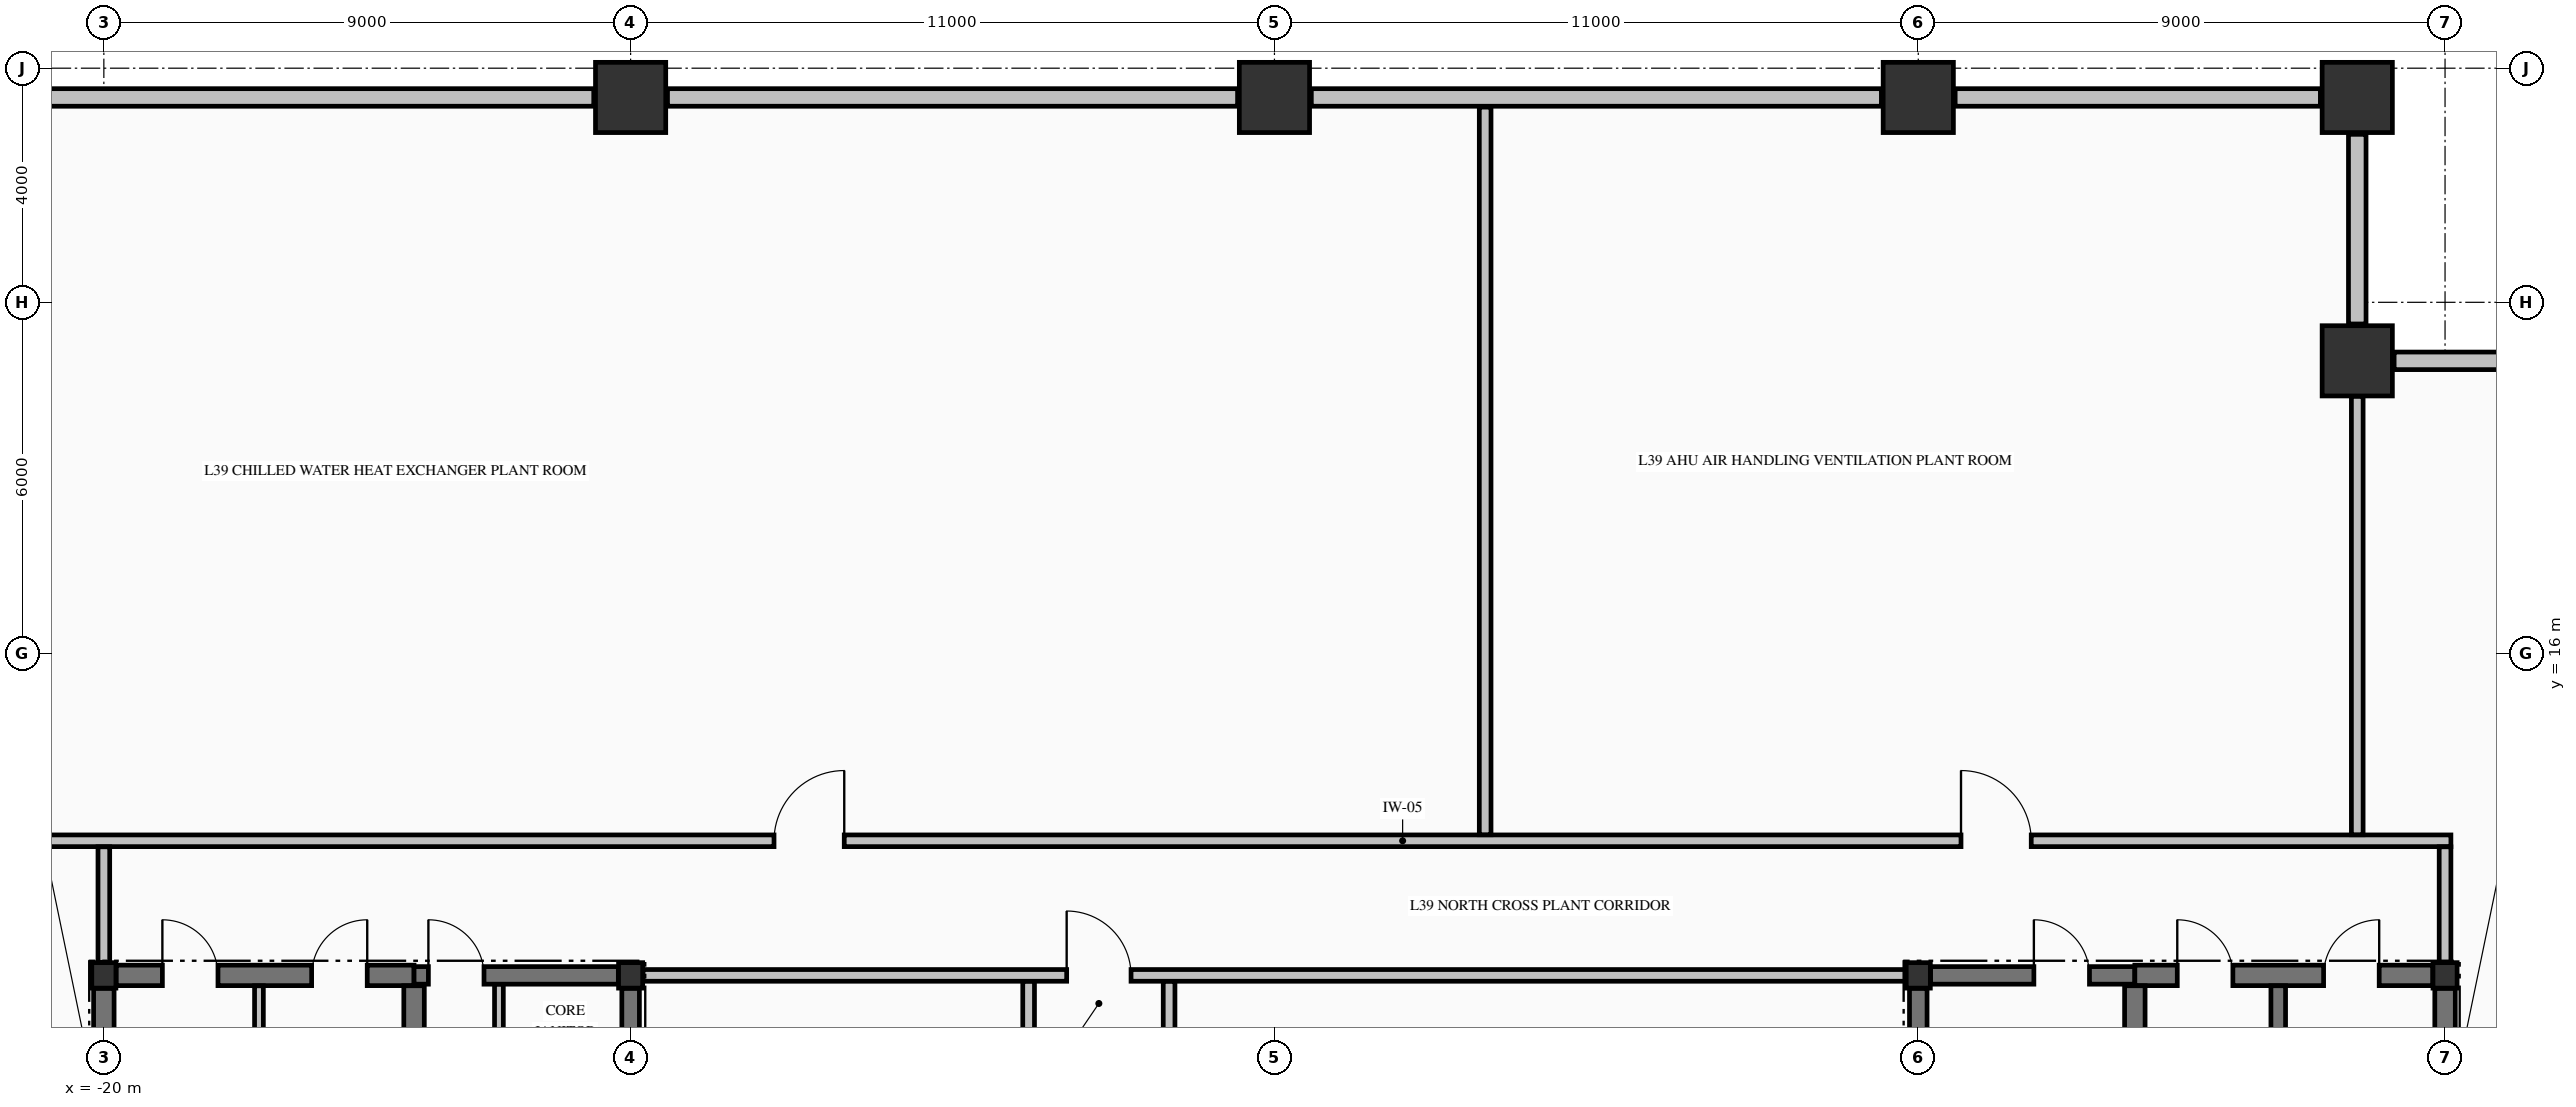
"""IFC4 building model, lengths in metres.
Left out: names, types, materials, properties, quantities, classifications, styles, units other than length and angle.
Written with IfcOpenShell. Run it as: python <this file> out.ifc"""

import sys

from ifc_helpers import new_model, si_unit, direction, frame, frame_2d, origin, origin_2d, place, context, subcontext, project, spatial, rectangle, i_section, extrude, element, fill, save


model = new_model("IFC4")
c1 = context("Model", 3, precision=1e-05, world=origin(), true_north=direction((0.0, 1.0)))
c2 = subcontext(c1, "Body", "Model", "MODEL_VIEW")
j1 = project(units=[si_unit("LENGTHUNIT", "METRE"), si_unit("PLANEANGLEUNIT", "RADIAN")], contexts=[c1])
p1 = place(None, origin())
s1 = spatial("IfcSite", under=j1, at=p1, CompositionType="ELEMENT")
p2 = place(p1, origin())
s2 = spatial("IfcBuilding", under=s1, at=p2, CompositionType="ELEMENT")
p3 = place(p2, frame((0.0, 0.0, 153.48)))
s3 = spatial("IfcBuildingStorey", under=s2, at=p3, CompositionType="ELEMENT", Elevation=153.48)
for number, where, z_axis, x_axis in (
    (1, (-11.0, 25.5, -0.425), (0.0, 0.0, 1.0), (1.0, 0.0, 0.0)),
    (2, (0.0, 25.5, -0.425), (0.0, 0.0, 1.0), (1.0, 0.0, 0.0)),
    (3, (11.0, 25.5, -0.425), (0.0, 0.0, 1.0), (1.0, 0.0, 0.0)),
    (4, (18.5, 25.5, -0.425), (0.0, 0.0, 1.0), (1.0, 0.0, 0.0)),
    (5, (18.5, 21.0, -0.425), (0.0, 0.0, 1.0), (1.0, 0.0, 0.0)),
):
    element("IfcColumn", number, at=place(p3, frame(where, z_axis=z_axis, x_axis=x_axis)), inside=s3, PredefinedType="COLUMN", context=c2, shape_type="SweptSolid", body=[
        extrude(rectangle(XDim=1.2, YDim=1.2, at=origin_2d()), origin(), (0.0, 0.0, 1.0), 4.76),
    ])
for number, where, z_axis, x_axis in (
    (6, (-20.0, 10.5, -0.425), (0.0, 0.0, 1.0), (1.0, 0.0, 0.0)),
    (7, (-11.0, 10.5, -0.425), (0.0, 0.0, 1.0), (1.0, 0.0, 0.0)),
    (8, (11.0, 10.5, -0.425), (0.0, 0.0, 1.0), (1.0, 0.0, 0.0)),
    (9, (20.0, 10.5, -0.425), (0.0, 0.0, 1.0), (1.0, 0.0, 0.0)),
):
    element("IfcColumn", number, at=place(p3, frame(where, z_axis=z_axis, x_axis=x_axis)), inside=s3, PredefinedType="COLUMN", context=c2, shape_type="SweptSolid", body=[
        extrude(i_section(OverallWidth=0.412, OverallDepth=0.435, WebThickness=0.036, FlangeThickness=0.058, FilletRadius=0.015, at=origin_2d()), origin(), (0.0, 0.0, 1.0), 4.76),
    ])
p4 = place(p3, frame((22.37, 21.0, 0.0), z_axis=(0.0, 0.0, 1.0), x_axis=(-1.0, 0.0, 0.0)))
e10 = element("IfcWall", 10, at=p4, inside=s3, PredefinedType="STANDARD", context=c2, shape_type="SweptSolid", body=[
    extrude(rectangle(XDim=3.24, YDim=0.3, at=frame_2d((1.62, 0.0))), origin(), (0.0, 0.0, 1.0), 1.927),
])
p5 = place(p3, frame((18.5, 21.63, 0.0), z_axis=(0.0, 0.0, 1.0), x_axis=(0.0, 1.0, 0.0)))
e11 = element("IfcWall", 11, at=p5, inside=s3, PredefinedType="STANDARD", context=c2, shape_type="SweptSolid", body=[
    extrude(rectangle(XDim=3.24, YDim=0.3, at=frame_2d((1.62, 0.0))), origin(), (0.0, 0.0, 1.0), 2.527),
])
p6 = place(p3, frame((-11.63, 25.5, 0.0), z_axis=(0.0, 0.0, 1.0), x_axis=(-1.0, 0.0, 0.0)))
e12 = element("IfcWall", 12, at=p6, inside=s3, PredefinedType="STANDARD", context=c2, shape_type="SweptSolid", body=[
    extrude(rectangle(XDim=11.24, YDim=0.3, at=frame_2d((5.62, 0.0))), origin(), (0.0, 0.0, 1.0), 1.927),
])
for number, where, z_axis, x_axis in (
    (13, (-0.63, 25.5, 0.0), (0.0, 0.0, 1.0), (-1.0, 0.0, 0.0)),
    (14, (10.37, 25.5, 0.0), (0.0, 0.0, 1.0), (-1.0, 0.0, 0.0)),
):
    element("IfcWall", number, at=place(p3, frame(where, z_axis=z_axis, x_axis=x_axis)), inside=s3, PredefinedType="STANDARD", context=c2, shape_type="SweptSolid", body=[
        extrude(rectangle(XDim=9.74, YDim=0.3, at=frame_2d((4.87, 0.0))), origin(), (0.0, 0.0, 1.0), 1.927),
    ])
p7 = place(p3, frame((17.87, 25.5, 0.0), z_axis=(0.0, 0.0, 1.0), x_axis=(-1.0, 0.0, 0.0)))
e15 = element("IfcWall", 15, at=p7, inside=s3, PredefinedType="STANDARD", context=c2, shape_type="SweptSolid", body=[
    extrude(rectangle(XDim=6.24, YDim=0.3, at=frame_2d((3.12, 0.0))), origin(), (0.0, 0.0, 1.0), 1.927),
])
p8 = place(p3, frame((-19.79, 10.5, 0.0), z_axis=(0.0, 0.0, 1.0), x_axis=(1.0, 0.0, 0.0)))
e16 = element("IfcWall", 16, at=p8, inside=s3, PredefinedType="SHEAR", context=c2, shape_type="SweptSolid", body=[
    extrude(rectangle(XDim=5.09, YDim=0.35, at=frame_2d((2.545, 0.0))), origin(), (0.0, 0.0, 1.0), 4.335),
])
p9 = place(p8, frame((0.79, 0.0, 0.0)))
e17 = element("IfcOpeningElement", 17, at=p9, cuts=e16, PredefinedType="OPENING", context=c2, shape_type="SweptSolid", body=[
    extrude(rectangle(XDim=0.95, YDim=2.02, at=frame_2d((0.475, 1.01))), frame((0.0, 0.185, 0.0), z_axis=(0.0, -1.0, 0.0), x_axis=(1.0, 0.0, 0.0)), (0.0, 0.0, 1.0), 0.37),
])
p10 = place(p8, frame((3.34, 0.0, 0.0)))
e18 = element("IfcOpeningElement", 18, at=p10, cuts=e16, PredefinedType="OPENING", context=c2, shape_type="SweptSolid", body=[
    extrude(rectangle(XDim=0.95, YDim=2.02, at=frame_2d((0.475, 1.01))), frame((0.0, 0.185, 0.0), z_axis=(0.0, -1.0, 0.0), x_axis=(1.0, 0.0, 0.0)), (0.0, 0.0, 1.0), 0.37),
])
p11 = place(p3, frame((-14.7, 10.5, 0.0), z_axis=(0.0, 0.0, 1.0), x_axis=(1.0, 0.0, 0.0)))
e19 = element("IfcWall", 19, at=p11, inside=s3, PredefinedType="SHEAR", context=c2, shape_type="SweptSolid", body=[
    extrude(rectangle(XDim=3.49, YDim=0.3, at=frame_2d((1.745, 0.0))), origin(), (0.0, 0.0, 1.0), 4.335),
])
p12 = place(p11, frame((0.245, 0.0, 0.0)))
e20 = element("IfcOpeningElement", 20, at=p12, cuts=e19, PredefinedType="OPENING", context=c2, shape_type="SweptSolid", body=[
    extrude(rectangle(XDim=0.95, YDim=2.02, at=frame_2d((0.475, 1.01))), frame((0.0, 0.16, 0.0), z_axis=(0.0, -1.0, 0.0), x_axis=(1.0, 0.0, 0.0)), (0.0, 0.0, 1.0), 0.32),
])
p13 = place(p3, frame((11.21, 10.5, 0.0), z_axis=(0.0, 0.0, 1.0), x_axis=(1.0, 0.0, 0.0)))
e21 = element("IfcWall", 21, at=p13, inside=s3, PredefinedType="SHEAR", context=c2, shape_type="SweptSolid", body=[
    extrude(rectangle(XDim=3.49, YDim=0.3, at=frame_2d((1.745, 0.0))), origin(), (0.0, 0.0, 1.0), 4.335),
])
p14 = place(p13, frame((1.765, 0.0, 0.0)))
e22 = element("IfcOpeningElement", 22, at=p14, cuts=e21, PredefinedType="OPENING", context=c2, shape_type="SweptSolid", body=[
    extrude(rectangle(XDim=0.95, YDim=2.02, at=frame_2d((0.475, 1.01))), frame((0.0, 0.16, 0.0), z_axis=(0.0, -1.0, 0.0), x_axis=(1.0, 0.0, 0.0)), (0.0, 0.0, 1.0), 0.32),
])
p15 = place(p3, frame((14.7, 10.5, 0.0), z_axis=(0.0, 0.0, 1.0), x_axis=(1.0, 0.0, 0.0)))
e23 = element("IfcWall", 23, at=p15, inside=s3, PredefinedType="SHEAR", context=c2, shape_type="SweptSolid", body=[
    extrude(rectangle(XDim=5.09, YDim=0.35, at=frame_2d((2.545, 0.0))), origin(), (0.0, 0.0, 1.0), 4.335),
])
p16 = place(p15, frame((0.725, 0.0, 0.0)))
e24 = element("IfcOpeningElement", 24, at=p16, cuts=e23, PredefinedType="OPENING", context=c2, shape_type="SweptSolid", body=[
    extrude(rectangle(XDim=0.95, YDim=2.02, at=frame_2d((0.475, 1.01))), frame((0.0, 0.185, 0.0), z_axis=(0.0, -1.0, 0.0), x_axis=(1.0, 0.0, 0.0)), (0.0, 0.0, 1.0), 0.37),
])
p17 = place(p15, frame((3.225, 0.0, 0.0)))
e25 = element("IfcOpeningElement", 25, at=p17, cuts=e23, PredefinedType="OPENING", context=c2, shape_type="SweptSolid", body=[
    extrude(rectangle(XDim=0.95, YDim=2.02, at=frame_2d((0.475, 1.01))), frame((0.0, 0.185, 0.0), z_axis=(0.0, -1.0, 0.0), x_axis=(1.0, 0.0, 0.0)), (0.0, 0.0, 1.0), 0.37),
])
p18 = place(p3, frame((-10.788, 10.5, 0.0), z_axis=(0.0, 0.0, 1.0), x_axis=(1.0, 0.0, 0.0)))
e26 = element("IfcWall", 26, at=p18, inside=s3, PredefinedType="PARTITIONING", context=c2, shape_type="SweptSolid", body=[
    extrude(rectangle(XDim=21.576, YDim=0.2, at=frame_2d((10.788, 0.0))), origin(), (0.0, 0.0, 1.0), 4.335),
])
p19 = place(p18, frame((7.238, 0.0, 0.0)))
e27 = element("IfcOpeningElement", 27, at=p19, cuts=e26, PredefinedType="OPENING", context=c2, shape_type="SweptSolid", body=[
    extrude(rectangle(XDim=1.1, YDim=2.15, at=frame_2d((0.55, 1.075))), frame((0.0, 0.11, 0.0), z_axis=(0.0, -1.0, 0.0), x_axis=(1.0, 0.0, 0.0)), (0.0, 0.0, 1.0), 0.22),
])
p20 = place(p3, frame((-23.6, 12.8, 0.0), z_axis=(0.0, 0.0, 1.0), x_axis=(1.0, 0.0, 0.0)))
e28 = element("IfcWall", 28, at=p20, inside=s3, PredefinedType="PARTITIONING", context=c2, shape_type="SweptSolid", body=[
    extrude(rectangle(XDim=43.7, YDim=0.2, at=frame_2d((21.85, 0.0))), origin(), (0.0, 0.0, 1.0), 4.335),
])
p21 = place(p20, frame((15.05, 0.0, 0.0)))
e29 = element("IfcOpeningElement", 29, at=p21, cuts=e28, PredefinedType="OPENING", context=c2, shape_type="SweptSolid", body=[
    extrude(rectangle(XDim=1.2, YDim=2.15, at=frame_2d((0.6, 1.075))), frame((0.0, 0.11, 0.0), z_axis=(0.0, -1.0, 0.0), x_axis=(1.0, 0.0, 0.0)), (0.0, 0.0, 1.0), 0.22),
])
p22 = place(p20, frame((35.33, 0.0, 0.0)))
e30 = element("IfcOpeningElement", 30, at=p22, cuts=e28, PredefinedType="OPENING", context=c2, shape_type="SweptSolid", body=[
    extrude(rectangle(XDim=1.2, YDim=2.15, at=frame_2d((0.6, 1.075))), frame((0.0, 0.11, 0.0), z_axis=(0.0, -1.0, 0.0), x_axis=(1.0, 0.0, 0.0)), (0.0, 0.0, 1.0), 0.22),
])
p23 = place(p3, frame((-20.0, 0.221, 0.0), z_axis=(0.0, 0.0, 1.0), x_axis=(0.0, 1.0, 0.0)))
e31 = element("IfcWall", 31, at=p23, inside=s3, PredefinedType="SHEAR", context=c2, shape_type="SweptSolid", body=[
    extrude(rectangle(XDim=10.057, YDim=0.35, at=frame_2d((5.029, 0.0))), origin(), (0.0, 0.0, 1.0), 4.335),
])
p24 = place(p3, frame((-14.7, 5.852, 0.0), z_axis=(0.0, 0.0, 1.0), x_axis=(0.0, 1.0, 0.0)))
e32 = element("IfcWall", 32, at=p24, inside=s3, PredefinedType="SHEAR", context=c2, shape_type="SweptSolid", body=[
    extrude(rectangle(XDim=4.471, YDim=0.35, at=frame_2d((2.235, 0.0))), origin(), (0.0, 0.0, 1.0), 4.335),
])
for number, where, z_axis, x_axis in (
    (33, (-11.0, 5.852, 0.0), (0.0, 0.0, 1.0), (0.0, 1.0, 0.0)),
    (34, (11.0, 5.852, 0.0), (0.0, 0.0, 1.0), (0.0, 1.0, 0.0)),
):
    element("IfcWall", number, at=place(p3, frame(where, z_axis=z_axis, x_axis=x_axis)), inside=s3, PredefinedType="SHEAR", context=c2, shape_type="SweptSolid", body=[
        extrude(rectangle(XDim=4.427, YDim=0.3, at=frame_2d((2.213, 0.0))), origin(), (0.0, 0.0, 1.0), 4.335),
    ])
p25 = place(p3, frame((14.7, 5.852, 0.0), z_axis=(0.0, 0.0, 1.0), x_axis=(0.0, 1.0, 0.0)))
e35 = element("IfcWall", 35, at=p25, inside=s3, PredefinedType="SHEAR", context=c2, shape_type="SweptSolid", body=[
    extrude(rectangle(XDim=4.471, YDim=0.35, at=frame_2d((2.235, 0.0))), origin(), (0.0, 0.0, 1.0), 4.335),
])
p26 = place(p3, frame((17.15, -4.423, 0.0), z_axis=(0.0, 0.0, 1.0), x_axis=(0.0, 1.0, 0.0)))
e36 = element("IfcWall", 36, at=p26, inside=s3, PredefinedType="SOLIDWALL", context=c2, shape_type="SweptSolid", body=[
    extrude(rectangle(XDim=14.746, YDim=0.25, at=frame_2d((7.373, 0.0))), origin(), (0.0, 0.0, 1.0), 4.335),
])
p27 = place(p3, frame((20.0, 0.221, 0.0), z_axis=(0.0, 0.0, 1.0), x_axis=(0.0, 1.0, 0.0)))
e37 = element("IfcWall", 37, at=p27, inside=s3, PredefinedType="SHEAR", context=c2, shape_type="SweptSolid", body=[
    extrude(rectangle(XDim=10.057, YDim=0.35, at=frame_2d((5.029, 0.0))), origin(), (0.0, 0.0, 1.0), 4.335),
])
p28 = place(p3, frame((-20.0, 10.723, 0.0), z_axis=(0.0, 0.0, 1.0), x_axis=(0.0, 1.0, 0.0)))
e38 = element("IfcWall", 38, at=p28, inside=s3, PredefinedType="PARTITIONING", context=c2, shape_type="SweptSolid", body=[
    extrude(rectangle(XDim=1.974, YDim=0.2, at=frame_2d((0.987, 0.0))), origin(), (0.0, 0.0, 1.0), 2.127),
])
p29 = place(p3, frame((-17.35, -0.097, 0.0), z_axis=(0.0, 0.0, 1.0), x_axis=(0.0, 1.0, 0.0)))
e39 = element("IfcWall", 39, at=p29, inside=s3, PredefinedType="PARTITIONING", context=c2, shape_type="SweptSolid", body=[
    extrude(rectangle(XDim=10.419, YDim=0.15, at=frame_2d((5.209, 0.0))), origin(), (0.0, 0.0, 1.0), 4.335),
])
p30 = place(p3, frame((-13.25, 5.853, 0.0), z_axis=(0.0, 0.0, 1.0), x_axis=(0.0, 1.0, 0.0)))
e40 = element("IfcWall", 40, at=p30, inside=s3, PredefinedType="PARTITIONING", context=c2, shape_type="SweptSolid", body=[
    extrude(rectangle(XDim=4.494, YDim=0.15, at=frame_2d((2.247, 0.0))), origin(), (0.0, 0.0, 1.0), 4.335),
])
p31 = place(p30, frame((1.472, 0.0, 0.0)))
e41 = element("IfcOpeningElement", 41, at=p31, cuts=e40, PredefinedType="OPENING", context=c2, shape_type="SweptSolid", body=[
    extrude(rectangle(XDim=0.95, YDim=2.15, at=frame_2d((0.475, 1.075))), frame((0.0, 0.085, 0.0), z_axis=(0.0, -1.0, 0.0), x_axis=(1.0, 0.0, 0.0)), (0.0, 0.0, 1.0), 0.17),
])
p32 = place(p3, frame((-4.2, 6.753, 0.0), z_axis=(0.0, 0.0, 1.0), x_axis=(0.0, 1.0, 0.0)))
e42 = element("IfcWall", 42, at=p32, inside=s3, PredefinedType="PARTITIONING", context=c2, shape_type="SweptSolid", body=[
    extrude(rectangle(XDim=3.644, YDim=0.2, at=frame_2d((1.822, 0.0))), origin(), (0.0, 0.0, 1.0), 4.335),
])
p33 = place(p32, frame((0.322, 0.0, 0.0)))
e43 = element("IfcOpeningElement", 43, at=p33, cuts=e42, PredefinedType="OPENING", context=c2, shape_type="SweptSolid", body=[
    extrude(rectangle(XDim=0.95, YDim=2.15, at=frame_2d((0.475, 1.075))), frame((0.0, 0.11, 0.0), z_axis=(0.0, -1.0, 0.0), x_axis=(1.0, 0.0, 0.0)), (0.0, 0.0, 1.0), 0.22),
])
p34 = place(p3, frame((-1.8, 6.703, 0.0), z_axis=(0.0, 0.0, 1.0), x_axis=(0.0, 1.0, 0.0)))
e44 = element("IfcWall", 44, at=p34, inside=s3, PredefinedType="PARTITIONING", context=c2, shape_type="SweptSolid", body=[
    extrude(rectangle(XDim=3.694, YDim=0.2, at=frame_2d((1.847, 0.0))), origin(), (0.0, 0.0, 1.0), 4.335),
])
p35 = place(p3, frame((3.6, 12.903, 0.0), z_axis=(0.0, 0.0, 1.0), x_axis=(0.0, 1.0, 0.0)))
e45 = element("IfcWall", 45, at=p35, inside=s3, PredefinedType="PARTITIONING", context=c2, shape_type="SweptSolid", body=[
    extrude(rectangle(XDim=12.432, YDim=0.2, at=frame_2d((6.216, 0.0))), origin(), (0.0, 0.0, 1.0), 4.335),
])
p36 = place(p3, frame((18.5, 12.903, 0.0), z_axis=(0.0, 0.0, 1.0), x_axis=(0.0, 1.0, 0.0)))
e46 = element("IfcWall", 46, at=p36, inside=s3, PredefinedType="PARTITIONING", context=c2, shape_type="SweptSolid", body=[
    extrude(rectangle(XDim=7.491, YDim=0.2, at=frame_2d((3.746, 0.0))), origin(), (0.0, 0.0, 1.0), 4.335),
])
p37 = place(p3, frame((20.0, 10.723, 0.0), z_axis=(0.0, 0.0, 1.0), x_axis=(0.0, 1.0, 0.0)))
e47 = element("IfcWall", 47, at=p37, inside=s3, PredefinedType="PARTITIONING", context=c2, shape_type="SweptSolid", body=[
    extrude(rectangle(XDim=1.974, YDim=0.2, at=frame_2d((0.987, 0.0))), origin(), (0.0, 0.0, 1.0), 2.127),
])
p38 = place(p12, origin())
e48 = element("IfcDoor", 48, at=p38, inside=s3, OperationType="SINGLE_SWING_LEFT", PredefinedType="DOOR", context=c2, shape_type="SweptSolid", body=[
    extrude(rectangle(XDim=0.95, YDim=2.02, at=frame_2d((0.475, 1.01))), frame((0.0, 0.025, 0.0), z_axis=(0.0, -1.0, 0.0), x_axis=(1.0, 0.0, 0.0)), (0.0, 0.0, 1.0), 0.05),
])
fill(e20, e48)
p39 = place(p14, origin())
e49 = element("IfcDoor", 49, at=p39, inside=s3, OperationType="SINGLE_SWING_LEFT", PredefinedType="DOOR", context=c2, shape_type="SweptSolid", body=[
    extrude(rectangle(XDim=0.95, YDim=2.02, at=frame_2d((0.475, 1.01))), frame((0.0, 0.025, 0.0), z_axis=(0.0, -1.0, 0.0), x_axis=(1.0, 0.0, 0.0)), (0.0, 0.0, 1.0), 0.05),
])
fill(e22, e49)
p40 = place(p9, origin())
e50 = element("IfcDoor", 50, at=p40, inside=s3, OperationType="SINGLE_SWING_LEFT", PredefinedType="DOOR", context=c2, shape_type="SweptSolid", body=[
    extrude(rectangle(XDim=0.95, YDim=2.02, at=frame_2d((0.475, 1.01))), frame((0.0, 0.025, 0.0), z_axis=(0.0, -1.0, 0.0), x_axis=(1.0, 0.0, 0.0)), (0.0, 0.0, 1.0), 0.05),
])
fill(e17, e50)
p41 = place(p10, origin())
e51 = element("IfcDoor", 51, at=p41, inside=s3, OperationType="SINGLE_SWING_RIGHT", PredefinedType="DOOR", context=c2, shape_type="SweptSolid", body=[
    extrude(rectangle(XDim=0.95, YDim=2.02, at=frame_2d((0.475, 1.01))), frame((0.0, 0.025, 0.0), z_axis=(0.0, -1.0, 0.0), x_axis=(1.0, 0.0, 0.0)), (0.0, 0.0, 1.0), 0.05),
])
fill(e18, e51)
p42 = place(p16, origin())
e52 = element("IfcDoor", 52, at=p42, inside=s3, OperationType="SINGLE_SWING_LEFT", PredefinedType="DOOR", context=c2, shape_type="SweptSolid", body=[
    extrude(rectangle(XDim=0.95, YDim=2.02, at=frame_2d((0.475, 1.01))), frame((0.0, 0.025, 0.0), z_axis=(0.0, -1.0, 0.0), x_axis=(1.0, 0.0, 0.0)), (0.0, 0.0, 1.0), 0.05),
])
fill(e24, e52)
p43 = place(p17, origin())
e53 = element("IfcDoor", 53, at=p43, inside=s3, OperationType="SINGLE_SWING_RIGHT", PredefinedType="DOOR", context=c2, shape_type="SweptSolid", body=[
    extrude(rectangle(XDim=0.95, YDim=2.02, at=frame_2d((0.475, 1.01))), frame((0.0, 0.025, 0.0), z_axis=(0.0, -1.0, 0.0), x_axis=(1.0, 0.0, 0.0)), (0.0, 0.0, 1.0), 0.05),
])
fill(e25, e53)
p44 = place(p19, origin())
e54 = element("IfcDoor", 54, at=p44, inside=s3, OperationType="SINGLE_SWING_LEFT", PredefinedType="DOOR", context=c2, shape_type="SweptSolid", body=[
    extrude(rectangle(XDim=1.1, YDim=2.15, at=frame_2d((0.55, 1.075))), frame((0.0, 0.025, 0.0), z_axis=(0.0, -1.0, 0.0), x_axis=(1.0, 0.0, 0.0)), (0.0, 0.0, 1.0), 0.05),
])
fill(e27, e54)
p45 = place(p21, origin())
e55 = element("IfcDoor", 55, at=p45, inside=s3, OperationType="SINGLE_SWING_RIGHT", PredefinedType="DOOR", context=c2, shape_type="SweptSolid", body=[
    extrude(rectangle(XDim=1.2, YDim=2.15, at=frame_2d((0.6, 1.075))), frame((0.0, 0.025, 0.0), z_axis=(0.0, -1.0, 0.0), x_axis=(1.0, 0.0, 0.0)), (0.0, 0.0, 1.0), 0.05),
])
fill(e29, e55)
p46 = place(p22, origin())
e56 = element("IfcDoor", 56, at=p46, inside=s3, OperationType="SINGLE_SWING_LEFT", PredefinedType="DOOR", context=c2, shape_type="SweptSolid", body=[
    extrude(rectangle(XDim=1.2, YDim=2.15, at=frame_2d((0.6, 1.075))), frame((0.0, 0.025, 0.0), z_axis=(0.0, -1.0, 0.0), x_axis=(1.0, 0.0, 0.0)), (0.0, 0.0, 1.0), 0.05),
])
fill(e30, e56)
save(model, sys.argv[1])
